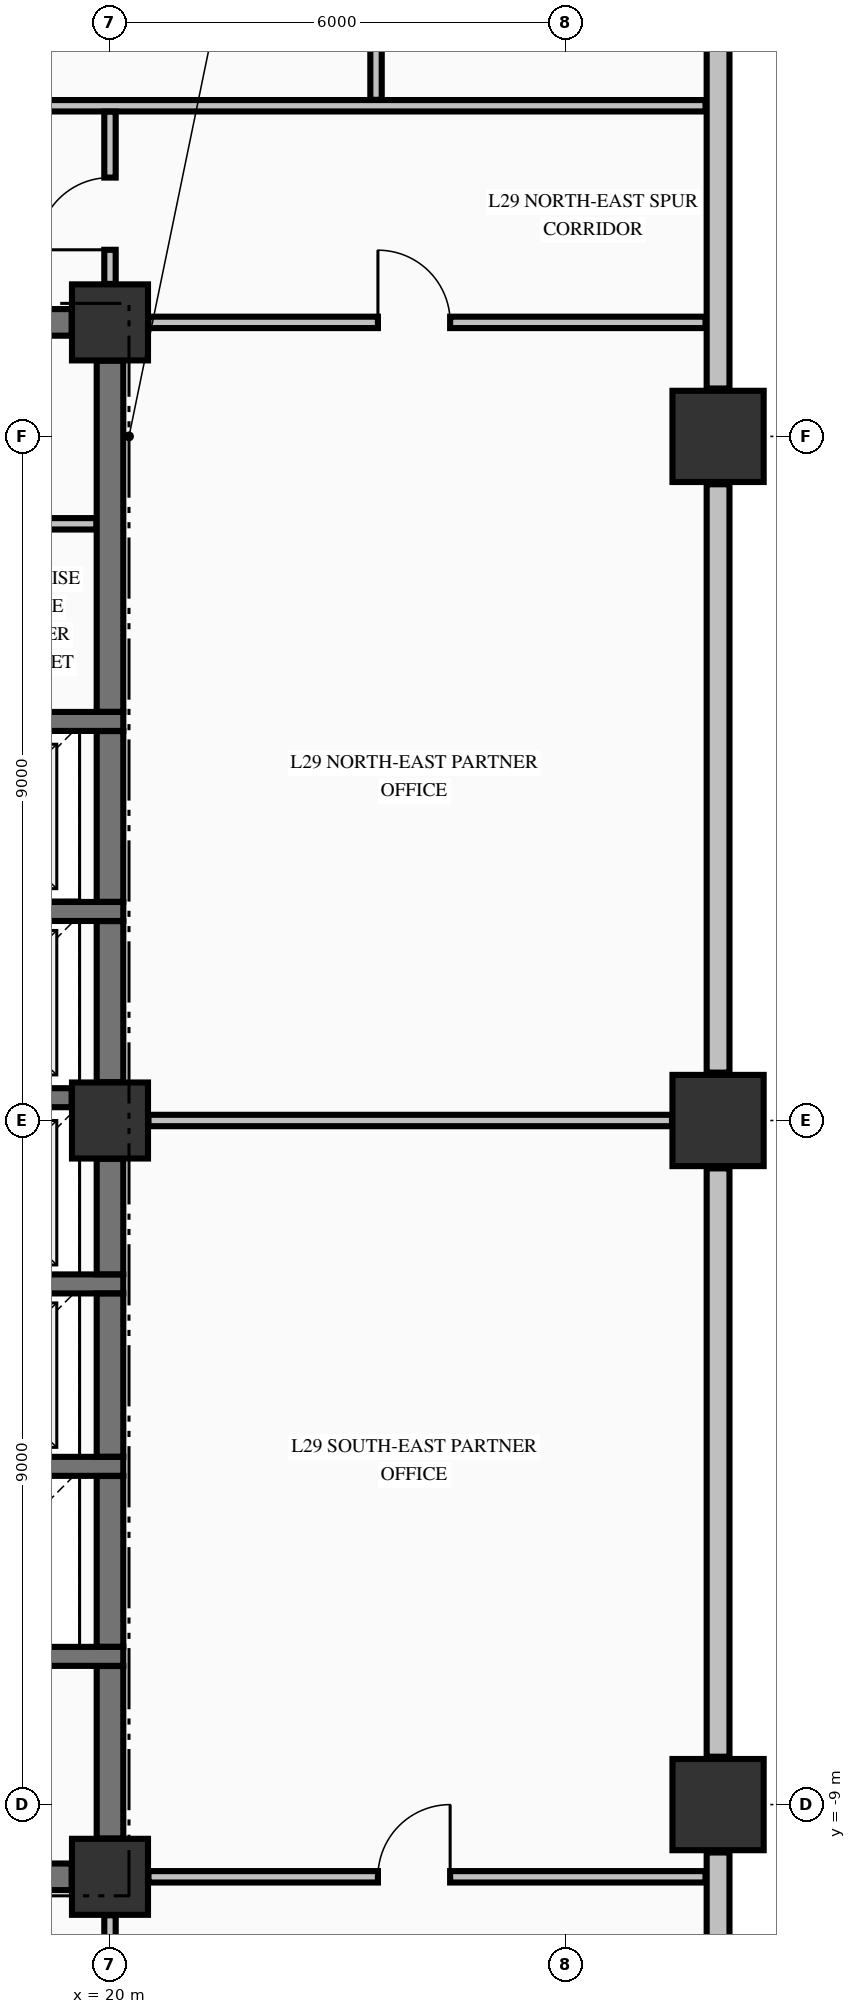
"""IFC4 building model, lengths in metres.
Left out: names, types, materials, properties, quantities, classifications, styles, units other than length and angle.
Written with IfcOpenShell. Run it as: python <this file> out.ifc"""

import sys

from ifc_helpers import new_model, si_unit, direction, frame, frame_2d, origin, origin_2d, place, context, subcontext, project, spatial, rectangle, extrude, element, fill, save


model = new_model("IFC4")
c1 = context("Model", 3, precision=1e-05, world=origin(), true_north=direction((0.0, 1.0)))
c2 = subcontext(c1, "Body", "Model", "MODEL_VIEW")
j1 = project(units=[si_unit("LENGTHUNIT", "METRE"), si_unit("PLANEANGLEUNIT", "RADIAN")], contexts=[c1])
p1 = place(None, origin())
s1 = spatial("IfcSite", under=j1, at=p1, CompositionType="ELEMENT")
p2 = place(p1, origin())
s2 = spatial("IfcBuilding", under=s1, at=p2, CompositionType="ELEMENT")
p3 = place(p2, frame((0.0, 0.0, 116.35)))
s3 = spatial("IfcBuildingStorey", under=s2, at=p3, CompositionType="ELEMENT", Elevation=116.35)
for number, where, z_axis, x_axis in (
    (1, (28.0, -9.0, -0.425), (0.0, 0.0, 1.0), (1.0, 0.0, 0.0)),
    (2, (28.0, 0.0, -0.425), (0.0, 0.0, 1.0), (1.0, 0.0, 0.0)),
    (3, (28.0, 9.0, -0.425), (0.0, 0.0, 1.0), (1.0, 0.0, 0.0)),
):
    element("IfcColumn", number, at=place(p3, frame(where, z_axis=z_axis, x_axis=x_axis)), inside=s3, PredefinedType="COLUMN", context=c2, shape_type="SweptSolid", body=[
        extrude(rectangle(XDim=1.2, YDim=1.2, at=origin_2d()), origin(), (0.0, 0.0, 1.0), 5.0),
    ])
for number, where, z_axis, x_axis in (
    (4, (20.0, -9.95, -0.425), (0.0, 0.0, 1.0), (1.0, 0.0, 0.0)),
    (5, (20.0, 10.5, -0.425), (0.0, 0.0, 1.0), (1.0, 0.0, 0.0)),
    (6, (20.0, 0.0, -0.425), (0.0, 0.0, 1.0), (1.0, 0.0, 0.0)),
):
    element("IfcColumn", number, at=place(p3, frame(where, z_axis=z_axis, x_axis=x_axis)), inside=s3, PredefinedType="COLUMN", context=c2, shape_type="SweptSolid", body=[
        extrude(rectangle(XDim=1.0, YDim=1.0, at=origin_2d()), origin(), (0.0, 0.0, 1.0), 5.0),
    ])
p4 = place(p3, frame((28.0, -20.37, 0.0), z_axis=(0.0, 0.0, 1.0), x_axis=(0.0, 1.0, 0.0)))
e7 = element("IfcWall", 7, at=p4, inside=s3, PredefinedType="STANDARD", context=c2, shape_type="SweptSolid", body=[
    extrude(rectangle(XDim=10.74, YDim=0.3, at=frame_2d((5.37, 0.0))), origin(), (0.0, 0.0, 1.0), 2.167),
])
for number, where, z_axis, x_axis in (
    (8, (28.0, -8.37, 0.0), (0.0, 0.0, 1.0), (0.0, 1.0, 0.0)),
    (9, (28.0, 0.63, 0.0), (0.0, 0.0, 1.0), (0.0, 1.0, 0.0)),
):
    element("IfcWall", number, at=place(p3, frame(where, z_axis=z_axis, x_axis=x_axis)), inside=s3, PredefinedType="STANDARD", context=c2, shape_type="SweptSolid", body=[
        extrude(rectangle(XDim=7.74, YDim=0.3, at=frame_2d((3.87, 0.0))), origin(), (0.0, 0.0, 1.0), 2.167),
    ])
p5 = place(p3, frame((28.0, 9.63, 0.0), z_axis=(0.0, 0.0, 1.0), x_axis=(0.0, 1.0, 0.0)))
e10 = element("IfcWall", 10, at=p5, inside=s3, PredefinedType="STANDARD", context=c2, shape_type="SweptSolid", body=[
    extrude(rectangle(XDim=10.74, YDim=0.3, at=frame_2d((5.37, 0.0))), origin(), (0.0, 0.0, 1.0), 2.167),
])
p6 = place(p3, frame((14.7, -9.95, 0.0), z_axis=(0.0, 0.0, 1.0), x_axis=(1.0, 0.0, 0.0)))
e11 = element("IfcWall", 11, at=p6, inside=s3, PredefinedType="SHEAR", context=c2, shape_type="SweptSolid", body=[
    extrude(rectangle(XDim=4.796, YDim=0.35, at=frame_2d((2.398, 0.0))), origin(), (0.0, 0.0, 1.0), 4.575),
])
p7 = place(p6, frame((0.65, 0.0, 0.0)))
e12 = element("IfcOpeningElement", 12, at=p7, cuts=e11, PredefinedType="OPENING", context=c2, shape_type="SweptSolid", body=[
    extrude(rectangle(XDim=1.2, YDim=2.15, at=frame_2d((0.6, 1.075))), frame((0.0, 0.185, 0.0), z_axis=(0.0, -1.0, 0.0), x_axis=(1.0, 0.0, 0.0)), (0.0, 0.0, 1.0), 0.37),
])
for number, where, z_axis, x_axis in (
    (13, (17.025, -7.05, 0.0), (0.0, 0.0, 1.0), (1.0, 0.0, 0.0)),
    (14, (17.025, -4.55, 0.0), (0.0, 0.0, 1.0), (1.0, 0.0, 0.0)),
    (15, (17.025, -2.15, 0.0), (0.0, 0.0, 1.0), (1.0, 0.0, 0.0)),
):
    element("IfcWall", number, at=place(p3, frame(where, z_axis=z_axis, x_axis=x_axis)), inside=s3, PredefinedType="SOLIDWALL", context=c2, shape_type="SweptSolid", body=[
        extrude(rectangle(XDim=3.15, YDim=0.25, at=frame_2d((1.575, 0.0))), origin(), (0.0, 0.0, 1.0), 4.575),
    ])
p8 = place(p3, frame((17.025, 0.3, 0.0), z_axis=(0.0, 0.0, 1.0), x_axis=(1.0, 0.0, 0.0)))
e16 = element("IfcWall", 16, at=p8, inside=s3, PredefinedType="SOLIDWALL", context=c2, shape_type="SweptSolid", body=[
    extrude(rectangle(XDim=2.471, YDim=0.25, at=frame_2d((1.236, 0.0))), origin(), (0.0, 0.0, 1.0), 4.575),
])
for number, where, z_axis, x_axis in (
    (17, (17.025, 2.75, 0.0), (0.0, 0.0, 1.0), (1.0, 0.0, 0.0)),
    (18, (17.025, 5.25, 0.0), (0.0, 0.0, 1.0), (1.0, 0.0, 0.0)),
):
    element("IfcWall", number, at=place(p3, frame(where, z_axis=z_axis, x_axis=x_axis)), inside=s3, PredefinedType="SOLIDWALL", context=c2, shape_type="SweptSolid", body=[
        extrude(rectangle(XDim=3.15, YDim=0.25, at=frame_2d((1.575, 0.0))), origin(), (0.0, 0.0, 1.0), 4.575),
    ])
p9 = place(p3, frame((14.7, 10.5, 0.0), z_axis=(0.0, 0.0, 1.0), x_axis=(1.0, 0.0, 0.0)))
e19 = element("IfcWall", 19, at=p9, inside=s3, PredefinedType="SHEAR", context=c2, shape_type="SweptSolid", body=[
    extrude(rectangle(XDim=4.796, YDim=0.35, at=frame_2d((2.398, 0.0))), origin(), (0.0, 0.0, 1.0), 4.575),
])
p10 = place(p9, frame((0.65, 0.0, 0.0)))
e20 = element("IfcOpeningElement", 20, at=p10, cuts=e19, PredefinedType="OPENING", context=c2, shape_type="SweptSolid", body=[
    extrude(rectangle(XDim=1.2, YDim=2.15, at=frame_2d((0.6, 1.075))), frame((0.0, 0.185, 0.0), z_axis=(0.0, -1.0, 0.0), x_axis=(1.0, 0.0, 0.0)), (0.0, 0.0, 1.0), 0.37),
])
p11 = place(p9, frame((3.225, 0.0, 0.0)))
e21 = element("IfcOpeningElement", 21, at=p11, cuts=e19, PredefinedType="OPENING", context=c2, shape_type="SweptSolid", body=[
    extrude(rectangle(XDim=0.95, YDim=2.15, at=frame_2d((0.475, 1.075))), frame((0.0, 0.185, 0.0), z_axis=(0.0, -1.0, 0.0), x_axis=(1.0, 0.0, 0.0)), (0.0, 0.0, 1.0), 0.37),
])
p12 = place(p3, frame((20.506, -9.95, 0.0), z_axis=(0.0, 0.0, 1.0), x_axis=(1.0, 0.0, 0.0)))
e22 = element("IfcWall", 22, at=p12, inside=s3, PredefinedType="PARTITIONING", context=c2, shape_type="SweptSolid", body=[
    extrude(rectangle(XDim=7.329, YDim=0.15, at=frame_2d((3.665, 0.0))), origin(), (0.0, 0.0, 1.0), 4.575),
])
p13 = place(p12, frame((3.019, 0.0, 0.0)))
e23 = element("IfcOpeningElement", 23, at=p13, cuts=e22, PredefinedType="OPENING", context=c2, shape_type="SweptSolid", body=[
    extrude(rectangle(XDim=0.95, YDim=2.02, at=frame_2d((0.475, 1.01))), frame((0.0, 0.085, 0.0), z_axis=(0.0, -1.0, 0.0), x_axis=(1.0, 0.0, 0.0)), (0.0, 0.0, 1.0), 0.17),
])
p14 = place(p3, frame((20.506, 0.0, 0.0), z_axis=(0.0, 0.0, 1.0), x_axis=(1.0, 0.0, 0.0)))
e24 = element("IfcWall", 24, at=p14, inside=s3, PredefinedType="PARTITIONING", context=c2, shape_type="SweptSolid", body=[
    extrude(rectangle(XDim=6.888, YDim=0.15, at=frame_2d((3.444, 0.0))), origin(), (0.0, 0.0, 1.0), 4.03),
])
p15 = place(p3, frame((17.05, 7.85, 0.0), z_axis=(0.0, 0.0, 1.0), x_axis=(1.0, 0.0, 0.0)))
e25 = element("IfcWall", 25, at=p15, inside=s3, PredefinedType="PARTITIONING", context=c2, shape_type="SweptSolid", body=[
    extrude(rectangle(XDim=2.772, YDim=0.15, at=frame_2d((1.386, 0.0))), origin(), (0.0, 0.0, 1.0), 4.575),
])
p16 = place(p3, frame((20.506, 10.5, 0.0), z_axis=(0.0, 0.0, 1.0), x_axis=(1.0, 0.0, 0.0)))
e26 = element("IfcWall", 26, at=p16, inside=s3, PredefinedType="PARTITIONING", context=c2, shape_type="SweptSolid", body=[
    extrude(rectangle(XDim=7.329, YDim=0.15, at=frame_2d((3.665, 0.0))), origin(), (0.0, 0.0, 1.0), 4.575),
])
p17 = place(p16, frame((3.019, 0.0, 0.0)))
e27 = element("IfcOpeningElement", 27, at=p17, cuts=e26, PredefinedType="OPENING", context=c2, shape_type="SweptSolid", body=[
    extrude(rectangle(XDim=0.95, YDim=2.02, at=frame_2d((0.475, 1.01))), frame((0.0, 0.085, 0.0), z_axis=(0.0, -1.0, 0.0), x_axis=(1.0, 0.0, 0.0)), (0.0, 0.0, 1.0), 0.17),
])
p18 = place(p3, frame((-22.835, 13.35, 0.0), z_axis=(0.0, 0.0, 1.0), x_axis=(1.0, 0.0, 0.0)))
e28 = element("IfcWall", 28, at=p18, inside=s3, PredefinedType="PARTITIONING", context=c2, shape_type="SweptSolid", body=[
    extrude(rectangle(XDim=50.67, YDim=0.15, at=frame_2d((25.335, 0.0))), origin(), (0.0, 0.0, 1.0), 4.575),
])
p19 = place(p18, frame((15.86, 0.0, 0.0)))
e29 = element("IfcOpeningElement", 29, at=p19, cuts=e28, PredefinedType="OPENING", context=c2, shape_type="SweptSolid", body=[
    extrude(rectangle(XDim=1.05, YDim=2.15, at=frame_2d((0.525, 1.075))), frame((0.0, 0.085, 0.0), z_axis=(0.0, -1.0, 0.0), x_axis=(1.0, 0.0, 0.0)), (0.0, 0.0, 1.0), 0.17),
])
p20 = place(p18, frame((29.81, 0.0, 0.0)))
e30 = element("IfcOpeningElement", 30, at=p20, cuts=e28, PredefinedType="OPENING", context=c2, shape_type="SweptSolid", body=[
    extrude(rectangle(XDim=1.05, YDim=2.15, at=frame_2d((0.525, 1.075))), frame((0.0, 0.085, 0.0), z_axis=(0.0, -1.0, 0.0), x_axis=(1.0, 0.0, 0.0)), (0.0, 0.0, 1.0), 0.17),
])
p21 = place(p3, frame((20.0, -9.446, 0.0), z_axis=(0.0, 0.0, 1.0), x_axis=(0.0, 1.0, 0.0)))
e31 = element("IfcWall", 31, at=p21, inside=s3, PredefinedType="SHEAR", context=c2, shape_type="SweptSolid", body=[
    extrude(rectangle(XDim=2.269, YDim=0.35, at=frame_2d((1.135, 0.0))), origin(), (0.0, 0.0, 1.0), 4.575),
])
p22 = place(p3, frame((20.0, -6.923, 0.0), z_axis=(0.0, 0.0, 1.0), x_axis=(0.0, 1.0, 0.0)))
e32 = element("IfcWall", 32, at=p22, inside=s3, PredefinedType="SHEAR", context=c2, shape_type="SweptSolid", body=[
    extrude(rectangle(XDim=2.246, YDim=0.35, at=frame_2d((1.123, 0.0))), origin(), (0.0, 0.0, 1.0), 4.575),
])
p23 = place(p3, frame((20.0, -4.423, 0.0), z_axis=(0.0, 0.0, 1.0), x_axis=(0.0, 1.0, 0.0)))
e33 = element("IfcWall", 33, at=p23, inside=s3, PredefinedType="SHEAR", context=c2, shape_type="SweptSolid", body=[
    extrude(rectangle(XDim=2.146, YDim=0.35, at=frame_2d((1.073, 0.0))), origin(), (0.0, 0.0, 1.0), 4.575),
])
p24 = place(p3, frame((20.0, -2.023, 0.0), z_axis=(0.0, 0.0, 1.0), x_axis=(0.0, 1.0, 0.0)))
e34 = element("IfcWall", 34, at=p24, inside=s3, PredefinedType="SHEAR", context=c2, shape_type="SweptSolid", body=[
    extrude(rectangle(XDim=1.519, YDim=0.35, at=frame_2d((0.76, 0.0))), origin(), (0.0, 0.0, 1.0), 4.575),
])
p25 = place(p3, frame((20.0, 0.504, 0.0), z_axis=(0.0, 0.0, 1.0), x_axis=(0.0, 1.0, 0.0)))
e35 = element("IfcWall", 35, at=p25, inside=s3, PredefinedType="SHEAR", context=c2, shape_type="SweptSolid", body=[
    extrude(rectangle(XDim=2.119, YDim=0.35, at=frame_2d((1.06, 0.0))), origin(), (0.0, 0.0, 1.0), 4.575),
])
p26 = place(p3, frame((20.0, 2.877, 0.0), z_axis=(0.0, 0.0, 1.0), x_axis=(0.0, 1.0, 0.0)))
e36 = element("IfcWall", 36, at=p26, inside=s3, PredefinedType="SHEAR", context=c2, shape_type="SweptSolid", body=[
    extrude(rectangle(XDim=2.246, YDim=0.35, at=frame_2d((1.123, 0.0))), origin(), (0.0, 0.0, 1.0), 4.575),
])
p27 = place(p3, frame((20.0, 5.377, 0.0), z_axis=(0.0, 0.0, 1.0), x_axis=(0.0, 1.0, 0.0)))
e37 = element("IfcWall", 37, at=p27, inside=s3, PredefinedType="SHEAR", context=c2, shape_type="SweptSolid", body=[
    extrude(rectangle(XDim=4.619, YDim=0.35, at=frame_2d((2.31, 0.0))), origin(), (0.0, 0.0, 1.0), 4.575),
])
p28 = place(p3, frame((20.0, -12.722, 0.0), z_axis=(0.0, 0.0, 1.0), x_axis=(0.0, 1.0, 0.0)))
e38 = element("IfcWall", 38, at=p28, inside=s3, PredefinedType="PARTITIONING", context=c2, shape_type="SweptSolid", body=[
    extrude(rectangle(XDim=2.266, YDim=0.15, at=frame_2d((1.133, 0.0))), origin(), (0.0, 0.0, 1.0), 4.03),
])
p29 = place(p28, frame((0.867, 0.0, 0.0)))
e39 = element("IfcOpeningElement", 39, at=p29, cuts=e38, PredefinedType="OPENING", context=c2, shape_type="SweptSolid", body=[
    extrude(rectangle(XDim=0.95, YDim=2.02, at=frame_2d((0.475, 1.01))), frame((0.0, 0.085, 0.0), z_axis=(0.0, -1.0, 0.0), x_axis=(1.0, 0.0, 0.0)), (0.0, 0.0, 1.0), 0.17),
])
p30 = place(p3, frame((20.0, 11.006, 0.0), z_axis=(0.0, 0.0, 1.0), x_axis=(0.0, 1.0, 0.0)))
e40 = element("IfcWall", 40, at=p30, inside=s3, PredefinedType="PARTITIONING", context=c2, shape_type="SweptSolid", body=[
    extrude(rectangle(XDim=2.266, YDim=0.15, at=frame_2d((1.133, 0.0))), origin(), (0.0, 0.0, 1.0), 4.03),
])
p31 = place(p30, frame((0.449, 0.0, 0.0)))
e41 = element("IfcOpeningElement", 41, at=p31, cuts=e40, PredefinedType="OPENING", context=c2, shape_type="SweptSolid", body=[
    extrude(rectangle(XDim=0.95, YDim=2.02, at=frame_2d((0.475, 1.01))), frame((0.0, 0.085, 0.0), z_axis=(0.0, -1.0, 0.0), x_axis=(1.0, 0.0, 0.0)), (0.0, 0.0, 1.0), 0.17),
])
p32 = place(p3, frame((23.5, 13.428, 0.0), z_axis=(0.0, 0.0, 1.0), x_axis=(0.0, 1.0, 0.0)))
e42 = element("IfcWall", 42, at=p32, inside=s3, PredefinedType="PARTITIONING", context=c2, shape_type="SweptSolid", body=[
    extrude(rectangle(XDim=6.966, YDim=0.15, at=frame_2d((3.483, 0.0))), origin(), (0.0, 0.0, 1.0), 2.167),
])
p33 = place(p31, origin())
e43 = element("IfcDoor", 43, at=p33, inside=s3, OperationType="SINGLE_SWING_LEFT", PredefinedType="DOOR", context=c2, shape_type="SweptSolid", body=[
    extrude(rectangle(XDim=0.95, YDim=2.02, at=frame_2d((0.475, 1.01))), frame((0.0, 0.025, 0.0), z_axis=(0.0, -1.0, 0.0), x_axis=(1.0, 0.0, 0.0)), (0.0, 0.0, 1.0), 0.05),
])
fill(e41, e43)
p34 = place(p17, origin())
e44 = element("IfcDoor", 44, at=p34, inside=s3, OperationType="SINGLE_SWING_LEFT", PredefinedType="DOOR", context=c2, shape_type="SweptSolid", body=[
    extrude(rectangle(XDim=0.95, YDim=2.02, at=frame_2d((0.475, 1.01))), frame((0.0, 0.025, 0.0), z_axis=(0.0, -1.0, 0.0), x_axis=(1.0, 0.0, 0.0)), (0.0, 0.0, 1.0), 0.05),
])
fill(e27, e44)
p35 = place(p13, origin())
e45 = element("IfcDoor", 45, at=p35, inside=s3, OperationType="SINGLE_SWING_RIGHT", PredefinedType="DOOR", context=c2, shape_type="SweptSolid", body=[
    extrude(rectangle(XDim=0.95, YDim=2.02, at=frame_2d((0.475, 1.01))), frame((0.0, 0.025, 0.0), z_axis=(0.0, -1.0, 0.0), x_axis=(1.0, 0.0, 0.0)), (0.0, 0.0, 1.0), 0.05),
])
fill(e23, e45)
save(model, sys.argv[1])
